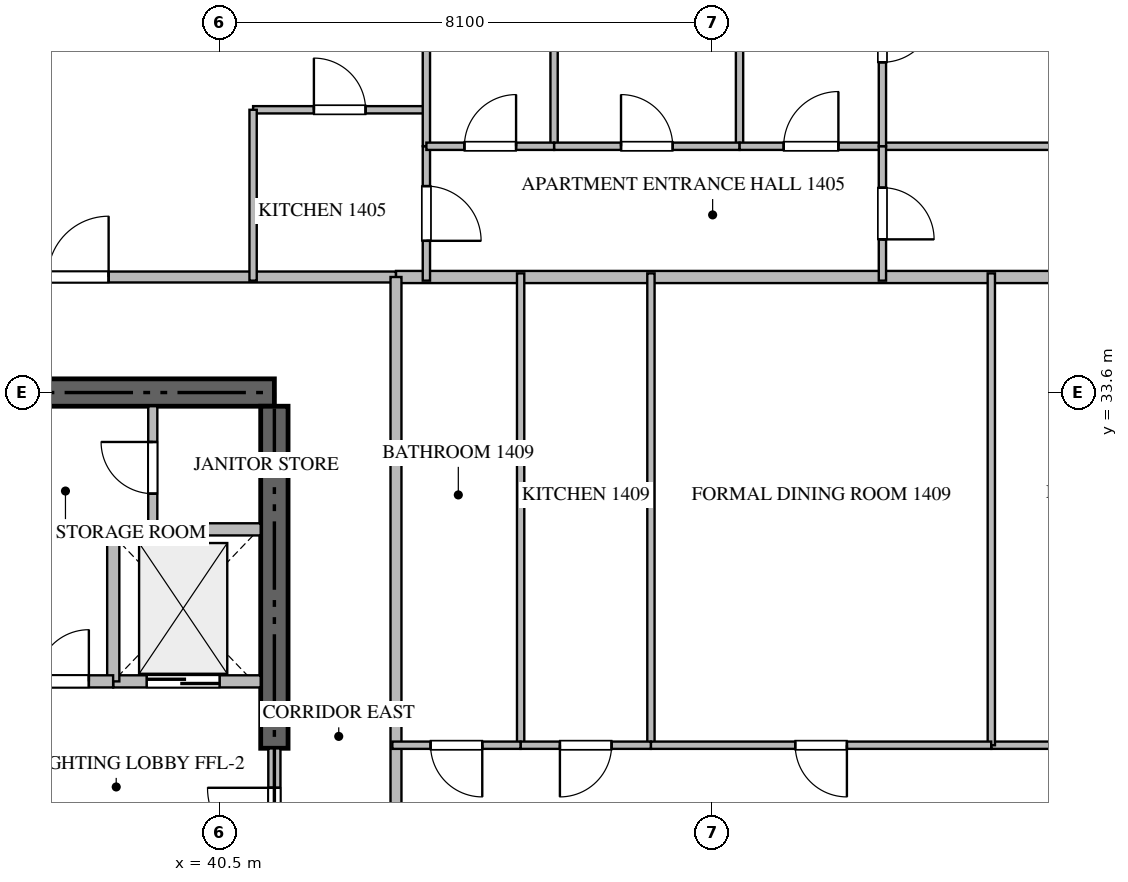
"""IFC4 building model, lengths in metres.
Left out: names, types, materials, properties, quantities, classifications, styles, units other than length and angle.
Written with IfcOpenShell. Run it as: python <this file> out.ifc"""

import sys

from ifc_helpers import new_model, si_unit, direction, frame, frame_2d, origin, place, context, subcontext, project, spatial, rectangle, extrude, source, transform, mapped, element, fill, save


model = new_model("IFC4")
c1 = context("Model", 3, precision=1e-05, world=origin(), true_north=direction((0.0, 1.0)))
c2 = subcontext(c1, "Body", "Model", "MODEL_VIEW")
j1 = project(units=[si_unit("LENGTHUNIT", "METRE"), si_unit("PLANEANGLEUNIT", "RADIAN")], contexts=[c1])
p1 = place(None, origin())
s1 = spatial("IfcSite", under=j1, at=p1, CompositionType="ELEMENT")
p2 = place(p1, origin())
s2 = spatial("IfcBuilding", under=s1, at=p2, CompositionType="ELEMENT")
p3 = place(p2, frame((0.0, 0.0, 60.45)))
s3 = spatial("IfcBuildingStorey", under=s2, at=p3, CompositionType="ELEMENT", Elevation=60.45)
p4 = place(p3, frame((41.4, 33.6, -0.26), z_axis=(0.0, 0.0, 1.0), x_axis=(-1.0, 0.0, 0.0)))
e1 = element("IfcWall", 1, at=p4, inside=s3, PredefinedType="SHEAR", context=c2, shape_type="SweptSolid", body=[
    extrude(rectangle(XDim=18.0, YDim=0.45, at=frame_2d((9.0, 0.0))), origin(), (0.0, 0.0, 1.0), 3.748),
])
p5 = place(p3, frame((41.4, 27.75, -0.26), z_axis=(0.0, 0.0, 1.0), x_axis=(0.0, 1.0, 0.0)))
e2 = element("IfcWall", 2, at=p5, inside=s3, PredefinedType="SHEAR", context=c2, shape_type="SweptSolid", body=[
    extrude(rectangle(XDim=5.625, YDim=0.45, at=frame_2d((2.812, 0.0))), origin(), (0.0, 0.0, 1.0), 3.748),
])
p6 = place(p3, frame((38.75, 28.85, 0.0), z_axis=(0.0, 0.0, 1.0), x_axis=(1.0, 0.0, 0.0)))
e3 = element("IfcWall", 3, at=p6, inside=s3, PredefinedType="STANDARD", context=c2, shape_type="SweptSolid", body=[
    extrude(rectangle(XDim=2.425, YDim=0.2, at=frame_2d((1.212, 0.0))), origin(), (0.0, 0.0, 1.0), 3.49),
])
p7 = place(p6, frame((0.55, 0.0, 0.0)))
e4 = element("IfcOpeningElement", 4, at=p7, cuts=e3, PredefinedType="OPENING", context=c2, shape_type="SweptSolid", body=[
    extrude(rectangle(XDim=1.2, YDim=2.2, at=frame_2d((0.6, 1.1))), frame((0.0, 0.11, 0.0), z_axis=(0.0, -1.0, 0.0), x_axis=(1.0, 0.0, 0.0)), (0.0, 0.0, 1.0), 0.22),
])
p8 = place(p3, frame((38.75, 28.85, 0.0), z_axis=(0.0, 0.0, 1.0), x_axis=(0.0, 1.0, 0.0)))
e5 = element("IfcWall", 5, at=p8, inside=s3, PredefinedType="STANDARD", context=c2, shape_type="SweptSolid", body=[
    extrude(rectangle(XDim=2.5, YDim=0.2, at=frame_2d((1.25, 0.0))), origin(), (0.0, 0.0, 1.0), 3.49),
])
p9 = place(p3, frame((38.75, 31.35, 0.0), z_axis=(0.0, 0.0, 1.0), x_axis=(1.0, 0.0, 0.0)))
e6 = element("IfcWall", 6, at=p9, inside=s3, PredefinedType="STANDARD", context=c2, shape_type="SweptSolid", body=[
    extrude(rectangle(XDim=2.425, YDim=0.2, at=frame_2d((1.212, 0.0))), origin(), (0.0, 0.0, 1.0), 3.49),
])
p10 = place(p3, frame((37.1, 28.85, 0.0), z_axis=(0.0, 0.0, 1.0), x_axis=(1.0, 0.0, 0.0)))
e7 = element("IfcWall", 7, at=p10, inside=s3, PredefinedType="STANDARD", context=c2, shape_type="SweptSolid", body=[
    extrude(rectangle(XDim=1.648, YDim=0.2, at=frame_2d((0.824, 0.0))), origin(), (0.0, 0.0, 1.0), 3.49),
])
p11 = place(p10, frame((0.399, 0.0, 0.0)))
e8 = element("IfcOpeningElement", 8, at=p11, cuts=e7, PredefinedType="OPENING", context=c2, shape_type="SweptSolid", body=[
    extrude(rectangle(XDim=0.85, YDim=2.1, at=frame_2d((0.425, 1.05))), frame((0.0, 0.11, 0.0), z_axis=(0.0, -1.0, 0.0), x_axis=(1.0, 0.0, 0.0)), (0.0, 0.0, 1.0), 0.22),
])
p12 = place(p3, frame((41.4, 25.352, 0.0), z_axis=(0.0, 0.0, 1.0), x_axis=(0.0, 1.0, 0.0)))
e9 = element("IfcWall", 9, at=p12, inside=s3, PredefinedType="STANDARD", context=c2, shape_type="SweptSolid", body=[
    extrude(rectangle(XDim=2.396, YDim=0.2, at=frame_2d((1.198, 0.0))), origin(), (0.0, 0.0, 1.0), 3.49),
])
p13 = place(p12, frame((0.648, 0.0, 0.0)))
e10 = element("IfcOpeningElement", 10, at=p13, cuts=e9, PredefinedType="OPENING", context=c2, shape_type="SweptSolid", body=[
    extrude(rectangle(XDim=1.1, YDim=2.15, at=frame_2d((0.55, 1.075))), frame((0.0, 0.11, 0.0), z_axis=(0.0, -1.0, 0.0), x_axis=(1.0, 0.0, 0.0)), (0.0, 0.0, 1.0), 0.22),
])
p14 = place(p3, frame((39.4, 31.35, 0.0), z_axis=(0.0, 0.0, 1.0), x_axis=(0.0, 1.0, 0.0)))
e11 = element("IfcWall", 11, at=p14, inside=s3, PredefinedType="PARTITIONING", context=c2, shape_type="SweptSolid", body=[
    extrude(rectangle(XDim=2.025, YDim=0.15, at=frame_2d((1.012, 0.0))), origin(), (0.0, 0.0, 1.0), 3.49),
])
p15 = place(p14, frame((0.587, 0.0, 0.0)))
e12 = element("IfcOpeningElement", 12, at=p15, cuts=e11, PredefinedType="OPENING", context=c2, shape_type="SweptSolid", body=[
    extrude(rectangle(XDim=0.85, YDim=2.1, at=frame_2d((0.425, 1.05))), frame((0.0, 0.085, 0.0), z_axis=(0.0, -1.0, 0.0), x_axis=(1.0, 0.0, 0.0)), (0.0, 0.0, 1.0), 0.17),
])
p16 = place(p3, frame((43.4, 35.5, 0.0), z_axis=(0.0, 0.0, 1.0), x_axis=(1.0, 0.0, 0.0)))
e13 = element("IfcWall", 13, at=p16, inside=s3, PredefinedType="PARTITIONING", context=c2, shape_type="SweptSolid", body=[
    extrude(rectangle(XDim=15.318, YDim=0.2, at=frame_2d((7.659, 0.0))), origin(), (0.0, 0.0, 1.0), 3.49),
])
p17 = place(p3, frame((21.402, 35.5, 0.0), z_axis=(0.0, 0.0, 1.0), x_axis=(1.0, 0.0, 0.0)))
e14 = element("IfcWall", 14, at=p17, inside=s3, PredefinedType="PARTITIONING", context=c2, shape_type="SweptSolid", body=[
    extrude(rectangle(XDim=21.996, YDim=0.18, at=frame_2d((10.998, 0.0))), origin(), (0.0, 0.0, 1.0), 3.49),
])
p18 = place(p17, frame((2.1, 0.0, 0.0)))
e15 = element("IfcOpeningElement", 15, at=p18, cuts=e14, PredefinedType="OPENING", context=c2, shape_type="SweptSolid", body=[
    extrude(rectangle(XDim=1.0, YDim=2.15, at=frame_2d((0.5, 1.075))), frame((0.0, 0.1, 0.0), z_axis=(0.0, -1.0, 0.0), x_axis=(1.0, 0.0, 0.0)), (0.0, 0.0, 1.0), 0.2),
])
p19 = place(p17, frame((5.942, 0.0, 0.0)))
e16 = element("IfcOpeningElement", 16, at=p19, cuts=e14, PredefinedType="OPENING", context=c2, shape_type="SweptSolid", body=[
    extrude(rectangle(XDim=1.0, YDim=2.15, at=frame_2d((0.5, 1.075))), frame((0.0, 0.1, 0.0), z_axis=(0.0, -1.0, 0.0), x_axis=(1.0, 0.0, 0.0)), (0.0, 0.0, 1.0), 0.2),
])
p20 = place(p17, frame((16.272, 0.0, 0.0)))
e17 = element("IfcOpeningElement", 17, at=p20, cuts=e14, PredefinedType="OPENING", context=c2, shape_type="SweptSolid", body=[
    extrude(rectangle(XDim=1.0, YDim=2.15, at=frame_2d((0.5, 1.075))), frame((0.0, 0.1, 0.0), z_axis=(0.0, -1.0, 0.0), x_axis=(1.0, 0.0, 0.0)), (0.0, 0.0, 1.0), 0.2),
])
p21 = place(p3, frame((43.4, 14.9, 0.0), z_axis=(0.0, 0.0, 1.0), x_axis=(0.0, 1.0, 0.0)))
e18 = element("IfcWall", 18, at=p21, inside=s3, PredefinedType="PARTITIONING", context=c2, shape_type="SweptSolid", body=[
    extrude(rectangle(XDim=20.6, YDim=0.18, at=frame_2d((10.3, 0.0))), origin(), (0.0, 0.0, 1.0), 3.49),
])
p22 = place(p21, frame((5.429, 0.0, 0.0)))
e19 = element("IfcOpeningElement", 19, at=p22, cuts=e18, PredefinedType="OPENING", context=c2, shape_type="SweptSolid", body=[
    extrude(rectangle(XDim=1.0, YDim=2.15, at=frame_2d((0.5, 1.075))), frame((0.0, 0.1, 0.0), z_axis=(0.0, -1.0, 0.0), x_axis=(1.0, 0.0, 0.0)), (0.0, 0.0, 1.0), 0.2),
])
p23 = place(p21, frame((10.506, 0.0, 0.0)))
e20 = element("IfcOpeningElement", 20, at=p23, cuts=e18, PredefinedType="OPENING", context=c2, shape_type="SweptSolid", body=[
    extrude(rectangle(XDim=1.0, YDim=2.15, at=frame_2d((0.5, 1.075))), frame((0.0, 0.1, 0.0), z_axis=(0.0, -1.0, 0.0), x_axis=(1.0, 0.0, 0.0)), (0.0, 0.0, 1.0), 0.2),
])
p24 = place(p3, frame((41.05, 38.25, 0.0), z_axis=(0.0, 0.0, 1.0), x_axis=(1.0, 0.0, 0.0)))
e21 = element("IfcWall", 21, at=p24, inside=s3, PredefinedType="PARTITIONING", context=c2, shape_type="SweptSolid", body=[
    extrude(rectangle(XDim=2.85, YDim=0.12, at=frame_2d((1.425, 0.0))), origin(), (0.0, 0.0, 1.0), 3.49),
])
p25 = place(p24, frame((1.0, 0.0, 0.0)))
e22 = element("IfcOpeningElement", 22, at=p25, cuts=e21, PredefinedType="OPENING", context=c2, shape_type="SweptSolid", body=[
    extrude(rectangle(XDim=0.85, YDim=2.1, at=frame_2d((0.425, 1.05))), frame((0.0, 0.07, 0.0), z_axis=(0.0, -1.0, 0.0), x_axis=(1.0, 0.0, 0.0)), (0.0, 0.0, 1.0), 0.14),
])
p26 = place(p3, frame((41.05, 38.25, 0.0), z_axis=(0.0, 0.0, 1.0), x_axis=(0.0, -1.0, 0.0)))
e23 = element("IfcWall", 23, at=p26, inside=s3, PredefinedType="PARTITIONING", context=c2, shape_type="SweptSolid", body=[
    extrude(rectangle(XDim=2.81, YDim=0.12, at=frame_2d((1.405, 0.0))), origin(), (0.0, 0.0, 1.0), 3.49),
])
p27 = place(p3, frame((43.9, 37.65, 0.0), z_axis=(0.0, 0.0, 1.0), x_axis=(0.0, -1.0, 0.0)))
e24 = element("IfcWall", 24, at=p27, inside=s3, PredefinedType="PARTITIONING", context=c2, shape_type="SweptSolid", body=[
    extrude(rectangle(XDim=2.21, YDim=0.12, at=frame_2d((1.105, 0.0))), origin(), (0.0, 0.0, 1.0), 3.49),
])
p28 = place(p27, frame((0.655, 0.0, 0.0)))
e25 = element("IfcOpeningElement", 25, at=p28, cuts=e24, PredefinedType="OPENING", context=c2, shape_type="SweptSolid", body=[
    extrude(rectangle(XDim=0.9, YDim=2.1, at=frame_2d((0.45, 1.05))), frame((0.0, 0.07, 0.0), z_axis=(0.0, -1.0, 0.0), x_axis=(1.0, 0.0, 0.0)), (0.0, 0.0, 1.0), 0.14),
])
p29 = place(p3, frame((43.9, 43.252, 0.0), z_axis=(0.0, 0.0, 1.0), x_axis=(0.0, -1.0, 0.0)))
e26 = element("IfcWall", 26, at=p29, inside=s3, PredefinedType="PARTITIONING", context=c2, shape_type="SweptSolid", body=[
    extrude(rectangle(XDim=5.6, YDim=0.12, at=frame_2d((2.8, 0.0))), origin(), (0.0, 0.0, 1.0), 3.49),
])
p30 = place(p3, frame((49.05, 50.105, 0.0), z_axis=(0.0, 0.0, 1.0), x_axis=(0.0, -1.0, 0.0)))
e27 = element("IfcWall", 27, at=p30, inside=s3, PredefinedType="PARTITIONING", context=c2, shape_type="SweptSolid", body=[
    extrude(rectangle(XDim=12.455, YDim=0.12, at=frame_2d((6.228, 0.0))), origin(), (0.0, 0.0, 1.0), 3.49),
])
p31 = place(p3, frame((46.0, 43.254, 0.0), z_axis=(0.0, 0.0, 1.0), x_axis=(0.0, -1.0, 0.0)))
e28 = element("IfcWall", 28, at=p31, inside=s3, PredefinedType="PARTITIONING", context=c2, shape_type="SweptSolid", body=[
    extrude(rectangle(XDim=5.604, YDim=0.12, at=frame_2d((2.802, 0.0))), origin(), (0.0, 0.0, 1.0), 3.49),
])
p32 = place(p3, frame((43.9, 37.65, 0.0), z_axis=(0.0, 0.0, 1.0), x_axis=(1.0, 0.0, 0.0)))
e29 = element("IfcWall", 29, at=p32, inside=s3, PredefinedType="PARTITIONING", context=c2, shape_type="SweptSolid", body=[
    extrude(rectangle(XDim=2.1, YDim=0.12, at=frame_2d((1.05, 0.0))), origin(), (0.0, 0.0, 1.0), 3.49),
])
p33 = place(p32, frame((0.625, 0.0, 0.0)))
e30 = element("IfcOpeningElement", 30, at=p33, cuts=e29, PredefinedType="OPENING", context=c2, shape_type="SweptSolid", body=[
    extrude(rectangle(XDim=0.85, YDim=2.1, at=frame_2d((0.425, 1.05))), frame((0.0, 0.07, 0.0), z_axis=(0.0, -1.0, 0.0), x_axis=(1.0, 0.0, 0.0)), (0.0, 0.0, 1.0), 0.14),
])
p34 = place(p3, frame((46.002, 37.65, 0.0), z_axis=(0.0, 0.0, 1.0), x_axis=(1.0, 0.0, 0.0)))
e31 = element("IfcWall", 31, at=p34, inside=s3, PredefinedType="PARTITIONING", context=c2, shape_type="SweptSolid", body=[
    extrude(rectangle(XDim=3.048, YDim=0.12, at=frame_2d((1.524, 0.0))), origin(), (0.0, 0.0, 1.0), 3.49),
])
p35 = place(p34, frame((1.099, 0.0, 0.0)))
e32 = element("IfcOpeningElement", 32, at=p35, cuts=e31, PredefinedType="OPENING", context=c2, shape_type="SweptSolid", body=[
    extrude(rectangle(XDim=0.85, YDim=2.1, at=frame_2d((0.425, 1.05))), frame((0.0, 0.07, 0.0), z_axis=(0.0, -1.0, 0.0), x_axis=(1.0, 0.0, 0.0)), (0.0, 0.0, 1.0), 0.14),
])
p36 = place(p3, frame((49.052, 37.65, 0.0), z_axis=(0.0, 0.0, 1.0), x_axis=(1.0, 0.0, 0.0)))
e33 = element("IfcWall", 33, at=p36, inside=s3, PredefinedType="PARTITIONING", context=c2, shape_type="SweptSolid", body=[
    extrude(rectangle(XDim=2.348, YDim=0.12, at=frame_2d((1.174, 0.0))), origin(), (0.0, 0.0, 1.0), 3.49),
])
p37 = place(p36, frame((0.724, 0.0, 0.0)))
e34 = element("IfcOpeningElement", 34, at=p37, cuts=e33, PredefinedType="OPENING", context=c2, shape_type="SweptSolid", body=[
    extrude(rectangle(XDim=0.9, YDim=2.1, at=frame_2d((0.45, 1.05))), frame((0.0, 0.07, 0.0), z_axis=(0.0, -1.0, 0.0), x_axis=(1.0, 0.0, 0.0)), (0.0, 0.0, 1.0), 0.14),
])
p38 = place(p3, frame((51.402, 37.65, 0.0), z_axis=(0.0, 0.0, 1.0), x_axis=(1.0, 0.0, 0.0)))
e35 = element("IfcWall", 35, at=p38, inside=s3, PredefinedType="PARTITIONING", context=c2, shape_type="SweptSolid", body=[
    extrude(rectangle(XDim=3.698, YDim=0.12, at=frame_2d((1.849, 0.0))), origin(), (0.0, 0.0, 1.0), 3.49),
])
p39 = place(p3, frame((51.4, 41.262, 0.0), z_axis=(0.0, 0.0, 1.0), x_axis=(0.0, -1.0, 0.0)))
e36 = element("IfcWall", 36, at=p39, inside=s3, PredefinedType="PARTITIONING", context=c2, shape_type="SweptSolid", body=[
    extrude(rectangle(XDim=3.612, YDim=0.12, at=frame_2d((1.806, 0.0))), origin(), (0.0, 0.0, 1.0), 3.49),
])
p40 = place(p39, frame((1.381, 0.0, 0.0)))
e37 = element("IfcOpeningElement", 37, at=p40, cuts=e36, PredefinedType="OPENING", context=c2, shape_type="SweptSolid", body=[
    extrude(rectangle(XDim=0.85, YDim=2.1, at=frame_2d((0.425, 1.05))), frame((0.0, 0.07, 0.0), z_axis=(0.0, -1.0, 0.0), x_axis=(1.0, 0.0, 0.0)), (0.0, 0.0, 1.0), 0.14),
])
p41 = place(p3, frame((51.4, 37.648, 0.0), z_axis=(0.0, 0.0, 1.0), x_axis=(0.0, -1.0, 0.0)))
e38 = element("IfcWall", 38, at=p41, inside=s3, PredefinedType="PARTITIONING", context=c2, shape_type="SweptSolid", body=[
    extrude(rectangle(XDim=2.208, YDim=0.12, at=frame_2d((1.104, 0.0))), origin(), (0.0, 0.0, 1.0), 3.49),
])
p42 = place(p41, frame((0.679, 0.0, 0.0)))
e39 = element("IfcOpeningElement", 39, at=p42, cuts=e38, PredefinedType="OPENING", context=c2, shape_type="SweptSolid", body=[
    extrude(rectangle(XDim=0.85, YDim=2.1, at=frame_2d((0.425, 1.05))), frame((0.0, 0.07, 0.0), z_axis=(0.0, -1.0, 0.0), x_axis=(1.0, 0.0, 0.0)), (0.0, 0.0, 1.0), 0.14),
])
p43 = place(p3, frame((58.705, 27.8, 0.0), z_axis=(0.0, 0.0, 1.0), x_axis=(-1.0, 0.0, 0.0)))
e40 = element("IfcWall", 40, at=p43, inside=s3, PredefinedType="PARTITIONING", context=c2, shape_type="SweptSolid", body=[
    extrude(rectangle(XDim=5.514, YDim=0.12, at=frame_2d((2.757, 0.0))), origin(), (0.0, 0.0, 1.0), 3.49),
])
p44 = place(p43, frame((2.538, 0.0, 0.0)))
e41 = element("IfcOpeningElement", 41, at=p44, cuts=e40, PredefinedType="OPENING", context=c2, shape_type="SweptSolid", body=[
    extrude(rectangle(XDim=0.9, YDim=2.1, at=frame_2d((0.45, 1.05))), frame((0.0, 0.07, 0.0), z_axis=(0.0, -1.0, 0.0), x_axis=(1.0, 0.0, 0.0)), (0.0, 0.0, 1.0), 0.14),
])
for number, where, z_axis, x_axis in (
    (42, (53.191, 27.8, 0.0), (0.0, 0.0, 1.0), (0.0, 1.0, 0.0)),
    (43, (47.593, 27.8, 0.0), (0.0, 0.0, 1.0), (0.0, 1.0, 0.0)),
    (44, (45.45, 27.8, 0.0), (0.0, 0.0, 1.0), (0.0, 1.0, 0.0)),
):
    element("IfcWall", number, at=place(p3, frame(where, z_axis=z_axis, x_axis=x_axis)), inside=s3, PredefinedType="PARTITIONING", context=c2, shape_type="SweptSolid", body=[
        extrude(rectangle(XDim=7.76, YDim=0.12, at=frame_2d((3.88, 0.0))), origin(), (0.0, 0.0, 1.0), 3.49),
    ])
p45 = place(p3, frame((53.189, 27.8, 0.0), z_axis=(0.0, 0.0, 1.0), x_axis=(-1.0, 0.0, 0.0)))
e45 = element("IfcWall", 45, at=p45, inside=s3, PredefinedType="PARTITIONING", context=c2, shape_type="SweptSolid", body=[
    extrude(rectangle(XDim=5.596, YDim=0.12, at=frame_2d((2.798, 0.0))), origin(), (0.0, 0.0, 1.0), 3.49),
])
p46 = place(p45, frame((2.373, 0.0, 0.0)))
e46 = element("IfcOpeningElement", 46, at=p46, cuts=e45, PredefinedType="OPENING", context=c2, shape_type="SweptSolid", body=[
    extrude(rectangle(XDim=0.85, YDim=2.1, at=frame_2d((0.425, 1.05))), frame((0.0, 0.07, 0.0), z_axis=(0.0, -1.0, 0.0), x_axis=(1.0, 0.0, 0.0)), (0.0, 0.0, 1.0), 0.14),
])
p47 = place(p3, frame((47.591, 27.8, 0.0), z_axis=(0.0, 0.0, 1.0), x_axis=(-1.0, 0.0, 0.0)))
e47 = element("IfcWall", 47, at=p47, inside=s3, PredefinedType="PARTITIONING", context=c2, shape_type="SweptSolid", body=[
    extrude(rectangle(XDim=2.141, YDim=0.12, at=frame_2d((1.071, 0.0))), origin(), (0.0, 0.0, 1.0), 3.49),
])
p48 = place(p47, frame((0.645, 0.0, 0.0)))
e48 = element("IfcOpeningElement", 48, at=p48, cuts=e47, PredefinedType="OPENING", context=c2, shape_type="SweptSolid", body=[
    extrude(rectangle(XDim=0.85, YDim=2.1, at=frame_2d((0.425, 1.05))), frame((0.0, 0.07, 0.0), z_axis=(0.0, -1.0, 0.0), x_axis=(1.0, 0.0, 0.0)), (0.0, 0.0, 1.0), 0.14),
])
p49 = place(p3, frame((45.448, 27.8, 0.0), z_axis=(0.0, 0.0, 1.0), x_axis=(-1.0, 0.0, 0.0)))
e49 = element("IfcWall", 49, at=p49, inside=s3, PredefinedType="PARTITIONING", context=c2, shape_type="SweptSolid", body=[
    extrude(rectangle(XDim=2.108, YDim=0.12, at=frame_2d((1.054, 0.0))), origin(), (0.0, 0.0, 1.0), 3.49),
])
p50 = place(p49, frame((0.629, 0.0, 0.0)))
e50 = element("IfcOpeningElement", 50, at=p50, cuts=e49, PredefinedType="OPENING", context=c2, shape_type="SweptSolid", body=[
    extrude(rectangle(XDim=0.85, YDim=2.1, at=frame_2d((0.425, 1.05))), frame((0.0, 0.07, 0.0), z_axis=(0.0, -1.0, 0.0), x_axis=(1.0, 0.0, 0.0)), (0.0, 0.0, 1.0), 0.14),
])
m1 = source(origin(), c2, "Body", "SweptSolid", [
    extrude(rectangle(XDim=1.2, YDim=2.2, at=frame_2d((0.6, 1.1))), frame((0.0, 0.025, 0.0), z_axis=(0.0, -1.0, 0.0), x_axis=(1.0, 0.0, 0.0)), (0.0, 0.0, 1.0), 0.05),
])
p51 = place(p7, origin())
e51 = element("IfcDoor", 51, at=p51, inside=s3, OperationType="DOUBLE_DOOR_SLIDING", PredefinedType="DOOR", context=c2, shape_type="MappedRepresentation", body=[
    mapped(m1, transform((0.0, 0.0, 0.0), scale=1.0)),
])
fill(e4, e51)
m2 = source(origin(), c2, "Body", "SweptSolid", [
    extrude(rectangle(XDim=0.85, YDim=2.1, at=frame_2d((0.425, 1.05))), frame((0.0, 0.025, 0.0), z_axis=(0.0, -1.0, 0.0), x_axis=(1.0, 0.0, 0.0)), (0.0, 0.0, 1.0), 0.05),
])
p52 = place(p11, origin())
e52 = element("IfcDoor", 52, at=p52, inside=s3, OperationType="SINGLE_SWING_RIGHT", PredefinedType="DOOR", context=c2, shape_type="MappedRepresentation", body=[
    mapped(m2, transform((0.0, 0.0, 0.0), scale=1.0)),
])
fill(e8, e52)
m3 = source(origin(), c2, "Body", "SweptSolid", [
    extrude(rectangle(XDim=1.1, YDim=2.15, at=frame_2d((0.55, 1.075))), frame((0.0, 0.025, 0.0), z_axis=(0.0, -1.0, 0.0), x_axis=(1.0, 0.0, 0.0)), (0.0, 0.0, 1.0), 0.05),
])
p53 = place(p13, origin())
e53 = element("IfcDoor", 53, at=p53, inside=s3, OperationType="SINGLE_SWING_RIGHT", PredefinedType="DOOR", context=c2, shape_type="MappedRepresentation", body=[
    mapped(m3, transform((0.0, 0.0, 0.0), scale=1.0)),
])
fill(e10, e53)
p54 = place(p15, origin())
e54 = element("IfcDoor", 54, at=p54, inside=s3, OperationType="SINGLE_SWING_RIGHT", PredefinedType="DOOR", context=c2, shape_type="MappedRepresentation", body=[
    mapped(m2, transform((0.0, 0.0, 0.0), scale=1.0)),
])
fill(e12, e54)
m4 = source(origin(), c2, "Body", "SweptSolid", [
    extrude(rectangle(XDim=1.0, YDim=2.15, at=frame_2d((0.5, 1.075))), frame((0.0, 0.025, 0.0), z_axis=(0.0, -1.0, 0.0), x_axis=(1.0, 0.0, 0.0)), (0.0, 0.0, 1.0), 0.05),
])
p55 = place(p20, origin())
e55 = element("IfcDoor", 55, at=p55, inside=s3, OperationType="SINGLE_SWING_RIGHT", PredefinedType="DOOR", context=c2, shape_type="MappedRepresentation", body=[
    mapped(m4, transform((0.0, 0.0, 0.0), scale=1.0)),
])
fill(e17, e55)
p56 = place(p25, origin())
e56 = element("IfcDoor", 56, at=p56, inside=s3, OperationType="SINGLE_SWING_LEFT", PredefinedType="DOOR", context=c2, shape_type="MappedRepresentation", body=[
    mapped(m2, transform((0.0, 0.0, 0.0), scale=1.0)),
])
fill(e22, e56)
m5 = source(origin(), c2, "Body", "SweptSolid", [
    extrude(rectangle(XDim=0.9, YDim=2.1, at=frame_2d((0.45, 1.05))), frame((0.0, 0.025, 0.0), z_axis=(0.0, -1.0, 0.0), x_axis=(1.0, 0.0, 0.0)), (0.0, 0.0, 1.0), 0.05),
])
p57 = place(p28, origin())
e57 = element("IfcDoor", 57, at=p57, inside=s3, OperationType="SINGLE_SWING_RIGHT", PredefinedType="DOOR", context=c2, shape_type="MappedRepresentation", body=[
    mapped(m5, transform((0.0, 0.0, 0.0), scale=1.0)),
])
fill(e25, e57)
p58 = place(p33, origin())
e58 = element("IfcDoor", 58, at=p58, inside=s3, OperationType="SINGLE_SWING_RIGHT", PredefinedType="DOOR", context=c2, shape_type="MappedRepresentation", body=[
    mapped(m2, transform((0.0, 0.0, 0.0), scale=1.0)),
])
fill(e30, e58)
p59 = place(p35, origin())
e59 = element("IfcDoor", 59, at=p59, inside=s3, OperationType="SINGLE_SWING_LEFT", PredefinedType="DOOR", context=c2, shape_type="MappedRepresentation", body=[
    mapped(m2, transform((0.0, 0.0, 0.0), scale=1.0)),
])
fill(e32, e59)
p60 = place(p37, origin())
e60 = element("IfcDoor", 60, at=p60, inside=s3, OperationType="SINGLE_SWING_RIGHT", PredefinedType="DOOR", context=c2, shape_type="MappedRepresentation", body=[
    mapped(m5, transform((0.0, 0.0, 0.0), scale=1.0)),
])
fill(e34, e60)
p61 = place(p40, origin())
e61 = element("IfcDoor", 61, at=p61, inside=s3, OperationType="SINGLE_SWING_LEFT", PredefinedType="DOOR", context=c2, shape_type="MappedRepresentation", body=[
    mapped(m2, transform((0.0, 0.0, 0.0), scale=1.0)),
])
fill(e37, e61)
p62 = place(p42, origin())
e62 = element("IfcDoor", 62, at=p62, inside=s3, OperationType="SINGLE_SWING_RIGHT", PredefinedType="DOOR", context=c2, shape_type="MappedRepresentation", body=[
    mapped(m2, transform((0.0, 0.0, 0.0), scale=1.0)),
])
fill(e39, e62)
p63 = place(p46, origin())
e63 = element("IfcDoor", 63, at=p63, inside=s3, OperationType="SINGLE_SWING_LEFT", PredefinedType="DOOR", context=c2, shape_type="MappedRepresentation", body=[
    mapped(m2, transform((0.0, 0.0, 0.0), scale=1.0)),
])
fill(e46, e63)
p64 = place(p48, origin())
e64 = element("IfcDoor", 64, at=p64, inside=s3, OperationType="SINGLE_SWING_RIGHT", PredefinedType="DOOR", context=c2, shape_type="MappedRepresentation", body=[
    mapped(m2, transform((0.0, 0.0, 0.0), scale=1.0)),
])
fill(e48, e64)
p65 = place(p50, origin())
e65 = element("IfcDoor", 65, at=p65, inside=s3, OperationType="SINGLE_SWING_LEFT", PredefinedType="DOOR", context=c2, shape_type="MappedRepresentation", body=[
    mapped(m2, transform((0.0, 0.0, 0.0), scale=1.0)),
])
fill(e50, e65)
save(model, sys.argv[1])
